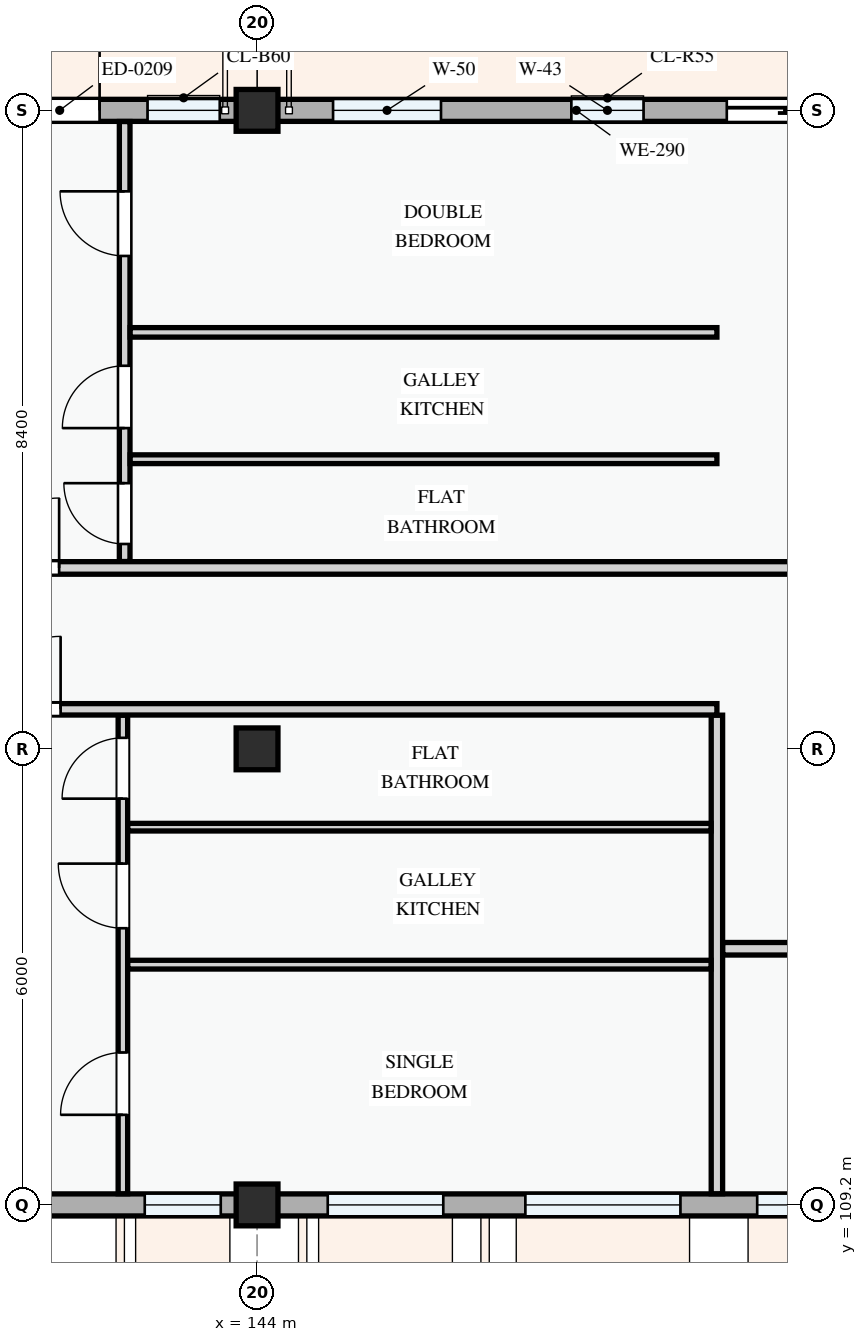
"""IFC4 building model, lengths in metres.
Left out: names, types, materials, properties, quantities, classifications, styles, units other than length and angle.
Written with IfcOpenShell. Run it as: python <this file> out.ifc"""

import sys

from ifc_helpers import new_model, si_unit, direction, frame, frame_2d, origin, origin_2d, place, context, subcontext, project, spatial, rectangle, extrude, element, fill, save


model = new_model("IFC4")
c1 = context("Model", 3, precision=1e-05, world=origin(), true_north=direction((0.0, 1.0)))
c2 = subcontext(c1, "Body", "Model", "MODEL_VIEW")
j1 = project(units=[si_unit("LENGTHUNIT", "METRE"), si_unit("PLANEANGLEUNIT", "RADIAN")], contexts=[c1])
p1 = place(None, origin())
s1 = spatial("IfcSite", under=j1, at=p1, CompositionType="ELEMENT")
p2 = place(p1, origin())
s2 = spatial("IfcBuilding", under=s1, at=p2, CompositionType="ELEMENT")
p3 = place(p2, frame((0.0, 0.0, 24.6)))
s3 = spatial("IfcBuildingStorey", under=s2, at=p3, CompositionType="ELEMENT", Elevation=24.6)
for number, where, z_axis, x_axis in (
    (1, (144.0, 109.2, 0.0), (0.0, 0.0, 1.0), (1.0, 0.0, 0.0)),
    (2, (144.0, 115.2, 0.0), (0.0, 0.0, 1.0), (1.0, 0.0, 0.0)),
    (3, (144.0, 123.6, 0.0), (0.0, 0.0, 1.0), (1.0, 0.0, 0.0)),
):
    element("IfcColumn", number, at=place(p3, frame(where, z_axis=z_axis, x_axis=x_axis)), inside=s3, PredefinedType="COLUMN", context=c2, shape_type="SweptSolid", body=[
        extrude(rectangle(XDim=0.55, YDim=0.55, at=origin_2d()), origin(), (0.0, 0.0, 1.0), 3.3),
    ])
p4 = place(p3, frame((152.4, 123.6, 0.0), z_axis=(0.0, 0.0, 1.0), x_axis=(-1.0, 0.0, 0.0)))
e4 = element("IfcWall", 4, at=p4, inside=s3, PredefinedType="STANDARD", context=c2, shape_type="SweptSolid", body=[
    extrude(rectangle(XDim=8.4, YDim=0.29, at=frame_2d((4.2, 0.0))), origin(), (0.0, 0.0, 1.0), 2.375),
])
p5 = place(p4, frame((0.62, 0.0, 0.0)))
e5 = element("IfcOpeningElement", 5, at=p5, cuts=e4, PredefinedType="OPENING", context=c2, shape_type="SweptSolid", body=[
    extrude(rectangle(XDim=1.6, YDim=2.2, at=frame_2d((0.8, 1.1))), frame((0.0, 0.155, 0.0), z_axis=(0.0, -1.0, 0.0), x_axis=(1.0, 0.0, 0.0)), (0.0, 0.0, 1.0), 0.31),
])
p6 = place(p4, frame((3.315, 0.0, 0.78)))
e6 = element("IfcOpeningElement", 6, at=p6, cuts=e4, PredefinedType="OPENING", context=c2, shape_type="SweptSolid", body=[
    extrude(rectangle(XDim=0.95, YDim=1.15, at=frame_2d((0.475, 0.575))), frame((0.0, 0.155, 0.0), z_axis=(0.0, -1.0, 0.0), x_axis=(1.0, 0.0, 0.0)), (0.0, 0.0, 1.0), 0.31),
])
p7 = place(p4, frame((5.98, 0.0, 0.78)))
e7 = element("IfcOpeningElement", 7, at=p7, cuts=e4, PredefinedType="OPENING", context=c2, shape_type="SweptSolid", body=[
    extrude(rectangle(XDim=1.42, YDim=1.38, at=frame_2d((0.71, 0.69))), frame((0.0, 0.155, 0.0), z_axis=(0.0, -1.0, 0.0), x_axis=(1.0, 0.0, 0.0)), (0.0, 0.0, 1.0), 0.31),
])
p8 = place(p3, frame((144.0, 123.6, 0.0), z_axis=(0.0, 0.0, 1.0), x_axis=(-1.0, 0.0, 0.0)))
e8 = element("IfcWall", 8, at=p8, inside=s3, PredefinedType="STANDARD", context=c2, shape_type="SweptSolid", body=[
    extrude(rectangle(XDim=6.0, YDim=0.29, at=frame_2d((3.0, 0.0))), origin(), (0.0, 0.0, 1.0), 2.475),
])
p9 = place(p8, frame((2.072, 0.0, 0.0)))
e9 = element("IfcOpeningElement", 9, at=p9, cuts=e8, PredefinedType="OPENING", context=c2, shape_type="SweptSolid", body=[
    extrude(rectangle(XDim=1.05, YDim=2.15, at=frame_2d((0.525, 1.075))), frame((0.0, 0.155, 0.0), z_axis=(0.0, -1.0, 0.0), x_axis=(1.0, 0.0, 0.0)), (0.0, 0.0, 1.0), 0.31),
])
p10 = place(p8, frame((0.491, 0.0, 0.78)))
e10 = element("IfcOpeningElement", 10, at=p10, cuts=e8, PredefinedType="OPENING", context=c2, shape_type="SweptSolid", body=[
    extrude(rectangle(XDim=0.95, YDim=1.15, at=frame_2d((0.475, 0.575))), frame((0.0, 0.155, 0.0), z_axis=(0.0, -1.0, 0.0), x_axis=(1.0, 0.0, 0.0)), (0.0, 0.0, 1.0), 0.31),
])
p11 = place(p8, frame((3.471, 0.0, 0.78)))
e11 = element("IfcOpeningElement", 11, at=p11, cuts=e8, PredefinedType="OPENING", context=c2, shape_type="SweptSolid", body=[
    extrude(rectangle(XDim=2.04, YDim=1.46, at=frame_2d((1.02, 0.73))), frame((0.0, 0.155, 0.0), z_axis=(0.0, -1.0, 0.0), x_axis=(1.0, 0.0, 0.0)), (0.0, 0.0, 1.0), 0.31),
])
p12 = place(p3, frame((138.0, 109.2, 0.0), z_axis=(0.0, 0.0, 1.0), x_axis=(1.0, 0.0, 0.0)))
e12 = element("IfcWall", 12, at=p12, inside=s3, PredefinedType="STANDARD", context=c2, shape_type="SweptSolid", body=[
    extrude(rectangle(XDim=6.0, YDim=0.29, at=frame_2d((3.0, 0.0))), origin(), (0.0, 0.0, 1.0), 2.475),
])
p13 = place(p12, frame((1.438, 0.0, 0.78)))
e13 = element("IfcOpeningElement", 13, at=p13, cuts=e12, PredefinedType="OPENING", context=c2, shape_type="SweptSolid", body=[
    extrude(rectangle(XDim=1.55, YDim=1.4, at=frame_2d((0.775, 0.7))), frame((0.0, 0.155, 0.0), z_axis=(0.0, -1.0, 0.0), x_axis=(1.0, 0.0, 0.0)), (0.0, 0.0, 1.0), 0.31),
])
p14 = place(p12, frame((4.522, 0.0, 0.78)))
e14 = element("IfcOpeningElement", 14, at=p14, cuts=e12, PredefinedType="OPENING", context=c2, shape_type="SweptSolid", body=[
    extrude(rectangle(XDim=1.0, YDim=1.25, at=frame_2d((0.5, 0.625))), frame((0.0, 0.155, 0.0), z_axis=(0.0, -1.0, 0.0), x_axis=(1.0, 0.0, 0.0)), (0.0, 0.0, 1.0), 0.31),
])
p15 = place(p3, frame((144.0, 109.2, 0.0), z_axis=(0.0, 0.0, 1.0), x_axis=(1.0, 0.0, 0.0)))
e15 = element("IfcWall", 15, at=p15, inside=s3, PredefinedType="STANDARD", context=c2, shape_type="SweptSolid", body=[
    extrude(rectangle(XDim=8.4, YDim=0.29, at=frame_2d((4.2, 0.0))), origin(), (0.0, 0.0, 1.0), 2.375),
])
p16 = place(p15, frame((0.93, 0.0, 0.78)))
e16 = element("IfcOpeningElement", 16, at=p16, cuts=e15, PredefinedType="OPENING", context=c2, shape_type="SweptSolid", body=[
    extrude(rectangle(XDim=1.52, YDim=1.42, at=frame_2d((0.76, 0.71))), frame((0.0, 0.155, 0.0), z_axis=(0.0, -1.0, 0.0), x_axis=(1.0, 0.0, 0.0)), (0.0, 0.0, 1.0), 0.31),
])
p17 = place(p15, frame((3.53, 0.0, 0.78)))
e17 = element("IfcOpeningElement", 17, at=p17, cuts=e15, PredefinedType="OPENING", context=c2, shape_type="SweptSolid", body=[
    extrude(rectangle(XDim=2.04, YDim=1.46, at=frame_2d((1.02, 0.73))), frame((0.0, 0.155, 0.0), z_axis=(0.0, -1.0, 0.0), x_axis=(1.0, 0.0, 0.0)), (0.0, 0.0, 1.0), 0.31),
])
p18 = place(p15, frame((6.58, 0.0, 0.78)))
e18 = element("IfcOpeningElement", 18, at=p18, cuts=e15, PredefinedType="OPENING", context=c2, shape_type="SweptSolid", body=[
    extrude(rectangle(XDim=1.1, YDim=1.3, at=frame_2d((0.55, 0.65))), frame((0.0, 0.155, 0.0), z_axis=(0.0, -1.0, 0.0), x_axis=(1.0, 0.0, 0.0)), (0.0, 0.0, 1.0), 0.31),
])
p19 = place(p3, frame((150.05, 109.347, 0.0), z_axis=(0.0, 0.0, 1.0), x_axis=(0.0, 1.0, 0.0)))
e19 = element("IfcWall", 19, at=p19, inside=s3, PredefinedType="PARTITIONING", context=c2, shape_type="SweptSolid", body=[
    extrude(rectangle(XDim=6.296, YDim=0.15, at=frame_2d((3.148, 0.0))), origin(), (0.0, 0.0, 1.0), 3.0),
])
p20 = place(p3, frame((150.127, 112.57, 0.0), z_axis=(0.0, 0.0, 1.0), x_axis=(1.0, 0.0, 0.0)))
e20 = element("IfcWall", 20, at=p20, inside=s3, PredefinedType="PARTITIONING", context=c2, shape_type="SweptSolid", body=[
    extrude(rectangle(XDim=2.413, YDim=0.165, at=frame_2d((1.207, 0.0))), origin(), (0.0, 0.0, 1.0), 3.0),
])
p21 = place(p3, frame((142.235, 109.347, 0.0), z_axis=(0.0, 0.0, 1.0), x_axis=(0.0, 1.0, 0.0)))
e21 = element("IfcWall", 21, at=p21, inside=s3, PredefinedType="PARTITIONING", context=c2, shape_type="SweptSolid", body=[
    extrude(rectangle(XDim=6.296, YDim=0.125, at=frame_2d((3.148, 0.0))), origin(), (0.0, 0.0, 1.0), 3.0),
])
p22 = place(p21, frame((1.038, 0.0, 0.0)))
e22 = element("IfcOpeningElement", 22, at=p22, cuts=e21, PredefinedType="OPENING", context=c2, shape_type="SweptSolid", body=[
    extrude(rectangle(XDim=0.82, YDim=2.08, at=frame_2d((0.41, 1.04))), frame((0.0, 0.073, 0.0), z_axis=(0.0, -1.0, 0.0), x_axis=(1.0, 0.0, 0.0)), (0.0, 0.0, 1.0), 0.145),
])
p23 = place(p21, frame((3.493, 0.0, 0.0)))
e23 = element("IfcOpeningElement", 23, at=p23, cuts=e21, PredefinedType="OPENING", context=c2, shape_type="SweptSolid", body=[
    extrude(rectangle(XDim=0.85, YDim=2.1, at=frame_2d((0.425, 1.05))), frame((0.0, 0.073, 0.0), z_axis=(0.0, -1.0, 0.0), x_axis=(1.0, 0.0, 0.0)), (0.0, 0.0, 1.0), 0.145),
])
p24 = place(p21, frame((5.198, 0.0, 0.0)))
e24 = element("IfcOpeningElement", 24, at=p24, cuts=e21, PredefinedType="OPENING", context=c2, shape_type="SweptSolid", body=[
    extrude(rectangle(XDim=0.8, YDim=2.1, at=frame_2d((0.4, 1.05))), frame((0.0, 0.073, 0.0), z_axis=(0.0, -1.0, 0.0), x_axis=(1.0, 0.0, 0.0)), (0.0, 0.0, 1.0), 0.145),
])
p25 = place(p3, frame((142.3, 112.361, 0.0), z_axis=(0.0, 0.0, 1.0), x_axis=(1.0, 0.0, 0.0)))
e25 = element("IfcWall", 25, at=p25, inside=s3, PredefinedType="PARTITIONING", context=c2, shape_type="SweptSolid", body=[
    extrude(rectangle(XDim=7.673, YDim=0.115, at=frame_2d((3.837, 0.0))), origin(), (0.0, 0.0, 1.0), 3.0),
])
p26 = place(p3, frame((142.3, 114.17, 0.0), z_axis=(0.0, 0.0, 1.0), x_axis=(1.0, 0.0, 0.0)))
e26 = element("IfcWall", 26, at=p26, inside=s3, PredefinedType="PARTITIONING", context=c2, shape_type="SweptSolid", body=[
    extrude(rectangle(XDim=7.673, YDim=0.1, at=frame_2d((3.837, 0.0))), origin(), (0.0, 0.0, 1.0), 3.0),
])
p27 = place(p3, frame((142.258, 117.665, 0.0), z_axis=(0.0, 0.0, 1.0), x_axis=(0.0, 1.0, 0.0)))
e27 = element("IfcWall", 27, at=p27, inside=s3, PredefinedType="PARTITIONING", context=c2, shape_type="SweptSolid", body=[
    extrude(rectangle(XDim=5.788, YDim=0.14, at=frame_2d((2.894, 0.0))), origin(), (0.0, 0.0, 1.0), 3.0),
])
p28 = place(p27, frame((0.231, 0.0, 0.0)))
e28 = element("IfcOpeningElement", 28, at=p28, cuts=e27, PredefinedType="OPENING", context=c2, shape_type="SweptSolid", body=[
    extrude(rectangle(XDim=0.8, YDim=2.1, at=frame_2d((0.4, 1.05))), frame((0.0, 0.08, 0.0), z_axis=(0.0, -1.0, 0.0), x_axis=(1.0, 0.0, 0.0)), (0.0, 0.0, 1.0), 0.16),
])
p29 = place(p27, frame((1.755, 0.0, 0.0)))
e29 = element("IfcOpeningElement", 29, at=p29, cuts=e27, PredefinedType="OPENING", context=c2, shape_type="SweptSolid", body=[
    extrude(rectangle(XDim=0.82, YDim=2.08, at=frame_2d((0.41, 1.04))), frame((0.0, 0.08, 0.0), z_axis=(0.0, -1.0, 0.0), x_axis=(1.0, 0.0, 0.0)), (0.0, 0.0, 1.0), 0.16),
])
p30 = place(p27, frame((4.02, 0.0, 0.0)))
e30 = element("IfcOpeningElement", 30, at=p30, cuts=e27, PredefinedType="OPENING", context=c2, shape_type="SweptSolid", body=[
    extrude(rectangle(XDim=0.85, YDim=2.1, at=frame_2d((0.425, 1.05))), frame((0.0, 0.08, 0.0), z_axis=(0.0, -1.0, 0.0), x_axis=(1.0, 0.0, 0.0)), (0.0, 0.0, 1.0), 0.16),
])
p31 = place(p3, frame((142.33, 120.679, 0.0), z_axis=(0.0, 0.0, 1.0), x_axis=(1.0, 0.0, 0.0)))
e31 = element("IfcWall", 31, at=p31, inside=s3, PredefinedType="PARTITIONING", context=c2, shape_type="SweptSolid", body=[
    extrude(rectangle(XDim=7.72, YDim=0.125, at=frame_2d((3.86, 0.0))), origin(), (0.0, 0.0, 1.0), 3.0),
])
p32 = place(p3, frame((142.33, 119.01, 0.0), z_axis=(0.0, 0.0, 1.0), x_axis=(1.0, 0.0, 0.0)))
e32 = element("IfcWall", 32, at=p32, inside=s3, PredefinedType="PARTITIONING", context=c2, shape_type="SweptSolid", body=[
    extrude(rectangle(XDim=7.72, YDim=0.115, at=frame_2d((3.86, 0.0))), origin(), (0.0, 0.0, 1.0), 3.0),
])
p33 = place(p3, frame((80.547, 115.72, 0.0), z_axis=(0.0, 0.0, 1.0), x_axis=(1.0, 0.0, 0.0)))
e33 = element("IfcWall", 33, at=p33, inside=s3, PredefinedType="PARTITIONING", context=c2, shape_type="SweptSolid", body=[
    extrude(rectangle(XDim=69.503, YDim=0.15, at=frame_2d((34.751, 0.0))), origin(), (0.0, 0.0, 1.0), 3.0),
])
p34 = place(p33, frame((2.367, 0.0, 0.0)))
e34 = element("IfcOpeningElement", 34, at=p34, cuts=e33, PredefinedType="OPENING", context=c2, shape_type="SweptSolid", body=[
    extrude(rectangle(XDim=0.92, YDim=2.1, at=frame_2d((0.46, 1.05))), frame((0.0, 0.085, 0.0), z_axis=(0.0, -1.0, 0.0), x_axis=(1.0, 0.0, 0.0)), (0.0, 0.0, 1.0), 0.17),
])
p35 = place(p33, frame((23.968, 0.0, 0.0)))
e35 = element("IfcOpeningElement", 35, at=p35, cuts=e33, PredefinedType="OPENING", context=c2, shape_type="SweptSolid", body=[
    extrude(rectangle(XDim=0.92, YDim=2.1, at=frame_2d((0.46, 1.05))), frame((0.0, 0.085, 0.0), z_axis=(0.0, -1.0, 0.0), x_axis=(1.0, 0.0, 0.0)), (0.0, 0.0, 1.0), 0.17),
])
p36 = place(p33, frame((39.133, 0.0, 0.0)))
e36 = element("IfcOpeningElement", 36, at=p36, cuts=e33, PredefinedType="OPENING", context=c2, shape_type="SweptSolid", body=[
    extrude(rectangle(XDim=0.92, YDim=2.1, at=frame_2d((0.46, 1.05))), frame((0.0, 0.085, 0.0), z_axis=(0.0, -1.0, 0.0), x_axis=(1.0, 0.0, 0.0)), (0.0, 0.0, 1.0), 0.17),
])
p37 = place(p33, frame((59.909, 0.0, 0.0)))
e37 = element("IfcOpeningElement", 37, at=p37, cuts=e33, PredefinedType="OPENING", context=c2, shape_type="SweptSolid", body=[
    extrude(rectangle(XDim=0.96, YDim=2.12, at=frame_2d((0.48, 1.06))), frame((0.0, 0.085, 0.0), z_axis=(0.0, -1.0, 0.0), x_axis=(1.0, 0.0, 0.0)), (0.0, 0.0, 1.0), 0.17),
])
p38 = place(p3, frame((80.547, 117.58, 0.0), z_axis=(0.0, 0.0, 1.0), x_axis=(1.0, 0.0, 0.0)))
e38 = element("IfcWall", 38, at=p38, inside=s3, PredefinedType="PARTITIONING", context=c2, shape_type="SweptSolid", body=[
    extrude(rectangle(XDim=71.993, YDim=0.165, at=frame_2d((35.997, 0.0))), origin(), (0.0, 0.0, 1.0), 3.0),
])
p39 = place(p38, frame((2.262, 0.0, 0.0)))
e39 = element("IfcOpeningElement", 39, at=p39, cuts=e38, PredefinedType="OPENING", context=c2, shape_type="SweptSolid", body=[
    extrude(rectangle(XDim=0.92, YDim=2.1, at=frame_2d((0.46, 1.05))), frame((0.0, 0.093, 0.0), z_axis=(0.0, -1.0, 0.0), x_axis=(1.0, 0.0, 0.0)), (0.0, 0.0, 1.0), 0.185),
])
p40 = place(p38, frame((23.945, 0.0, 0.0)))
e40 = element("IfcOpeningElement", 40, at=p40, cuts=e38, PredefinedType="OPENING", context=c2, shape_type="SweptSolid", body=[
    extrude(rectangle(XDim=0.92, YDim=2.1, at=frame_2d((0.46, 1.05))), frame((0.0, 0.093, 0.0), z_axis=(0.0, -1.0, 0.0), x_axis=(1.0, 0.0, 0.0)), (0.0, 0.0, 1.0), 0.185),
])
p41 = place(p38, frame((39.133, 0.0, 0.0)))
e41 = element("IfcOpeningElement", 41, at=p41, cuts=e38, PredefinedType="OPENING", context=c2, shape_type="SweptSolid", body=[
    extrude(rectangle(XDim=0.92, YDim=2.1, at=frame_2d((0.46, 1.05))), frame((0.0, 0.093, 0.0), z_axis=(0.0, -1.0, 0.0), x_axis=(1.0, 0.0, 0.0)), (0.0, 0.0, 1.0), 0.185),
])
p42 = place(p38, frame((59.929, 0.0, 0.0)))
e42 = element("IfcOpeningElement", 42, at=p42, cuts=e38, PredefinedType="OPENING", context=c2, shape_type="SweptSolid", body=[
    extrude(rectangle(XDim=0.92, YDim=2.1, at=frame_2d((0.46, 1.05))), frame((0.0, 0.093, 0.0), z_axis=(0.0, -1.0, 0.0), x_axis=(1.0, 0.0, 0.0)), (0.0, 0.0, 1.0), 0.185),
])
p43 = place(p5, frame((1.6, 0.0, 0.0), z_axis=(0.0, 0.0, 1.0), x_axis=(-1.0, 0.0, 0.0)))
e43 = element("IfcDoor", 43, at=p43, inside=s3, OperationType="SLIDING_TO_LEFT", PredefinedType="DOOR", context=c2, shape_type="SweptSolid", body=[
    extrude(rectangle(XDim=1.6, YDim=2.2, at=frame_2d((0.8, 1.1))), frame((0.0, 0.025, 0.0), z_axis=(0.0, -1.0, 0.0), x_axis=(1.0, 0.0, 0.0)), (0.0, 0.0, 1.0), 0.05),
])
fill(e5, e43)
p44 = place(p6, origin())
e44 = element("IfcWindow", 44, at=p44, inside=s3, PartitioningType="SINGLE_PANEL", PredefinedType="WINDOW", context=c2, shape_type="SweptSolid", body=[
    extrude(rectangle(XDim=0.95, YDim=1.15, at=frame_2d((0.475, 0.575))), frame((0.0, 0.03, 0.0), z_axis=(0.0, -1.0, 0.0), x_axis=(1.0, 0.0, 0.0)), (0.0, 0.0, 1.0), 0.06),
])
fill(e6, e44)
p45 = place(p7, origin())
e45 = element("IfcWindow", 45, at=p45, inside=s3, PartitioningType="SINGLE_PANEL", PredefinedType="WINDOW", context=c2, shape_type="SweptSolid", body=[
    extrude(rectangle(XDim=1.42, YDim=1.38, at=frame_2d((0.71, 0.69))), frame((0.0, 0.03, 0.0), z_axis=(0.0, -1.0, 0.0), x_axis=(1.0, 0.0, 0.0)), (0.0, 0.0, 1.0), 0.06),
])
fill(e7, e45)
p46 = place(p9, frame((1.05, 0.0, 0.0), z_axis=(0.0, 0.0, 1.0), x_axis=(-1.0, 0.0, 0.0)))
e46 = element("IfcDoor", 46, at=p46, inside=s3, OperationType="SINGLE_SWING_RIGHT", PredefinedType="DOOR", context=c2, shape_type="SweptSolid", body=[
    extrude(rectangle(XDim=1.05, YDim=2.15, at=frame_2d((0.525, 1.075))), frame((0.0, 0.025, 0.0), z_axis=(0.0, -1.0, 0.0), x_axis=(1.0, 0.0, 0.0)), (0.0, 0.0, 1.0), 0.05),
])
fill(e9, e46)
p47 = place(p10, origin())
e47 = element("IfcWindow", 47, at=p47, inside=s3, PartitioningType="SINGLE_PANEL", PredefinedType="WINDOW", context=c2, shape_type="SweptSolid", body=[
    extrude(rectangle(XDim=0.95, YDim=1.15, at=frame_2d((0.475, 0.575))), frame((0.0, 0.03, 0.0), z_axis=(0.0, -1.0, 0.0), x_axis=(1.0, 0.0, 0.0)), (0.0, 0.0, 1.0), 0.06),
])
fill(e10, e47)
p48 = place(p14, origin())
e48 = element("IfcWindow", 48, at=p48, inside=s3, PartitioningType="SINGLE_PANEL", PredefinedType="WINDOW", context=c2, shape_type="SweptSolid", body=[
    extrude(rectangle(XDim=1.0, YDim=1.25, at=frame_2d((0.5, 0.625))), frame((0.0, 0.03, 0.0), z_axis=(0.0, -1.0, 0.0), x_axis=(1.0, 0.0, 0.0)), (0.0, 0.0, 1.0), 0.06),
])
fill(e14, e48)
p49 = place(p16, origin())
e49 = element("IfcWindow", 49, at=p49, inside=s3, PartitioningType="SINGLE_PANEL", PredefinedType="WINDOW", context=c2, shape_type="SweptSolid", body=[
    extrude(rectangle(XDim=1.52, YDim=1.42, at=frame_2d((0.76, 0.71))), frame((0.0, 0.03, 0.0), z_axis=(0.0, -1.0, 0.0), x_axis=(1.0, 0.0, 0.0)), (0.0, 0.0, 1.0), 0.06),
])
fill(e16, e49)
p50 = place(p17, origin())
e50 = element("IfcWindow", 50, at=p50, inside=s3, PartitioningType="DOUBLE_PANEL_VERTICAL", PredefinedType="WINDOW", context=c2, shape_type="SweptSolid", body=[
    extrude(rectangle(XDim=2.04, YDim=1.46, at=frame_2d((1.02, 0.73))), frame((0.0, 0.03, 0.0), z_axis=(0.0, -1.0, 0.0), x_axis=(1.0, 0.0, 0.0)), (0.0, 0.0, 1.0), 0.06),
])
fill(e17, e50)
p51 = place(p18, origin())
e51 = element("IfcWindow", 51, at=p51, inside=s3, PartitioningType="SINGLE_PANEL", PredefinedType="WINDOW", context=c2, shape_type="SweptSolid", body=[
    extrude(rectangle(XDim=1.1, YDim=1.3, at=frame_2d((0.55, 0.65))), frame((0.0, 0.03, 0.0), z_axis=(0.0, -1.0, 0.0), x_axis=(1.0, 0.0, 0.0)), (0.0, 0.0, 1.0), 0.06),
])
fill(e18, e51)
p52 = place(p22, origin())
e52 = element("IfcDoor", 52, at=p52, inside=s3, OperationType="SINGLE_SWING_LEFT", PredefinedType="DOOR", context=c2, shape_type="SweptSolid", body=[
    extrude(rectangle(XDim=0.82, YDim=2.08, at=frame_2d((0.41, 1.04))), frame((0.0, 0.025, 0.0), z_axis=(0.0, -1.0, 0.0), x_axis=(1.0, 0.0, 0.0)), (0.0, 0.0, 1.0), 0.05),
])
fill(e22, e52)
p53 = place(p23, origin())
e53 = element("IfcDoor", 53, at=p53, inside=s3, OperationType="SINGLE_SWING_RIGHT", PredefinedType="DOOR", context=c2, shape_type="SweptSolid", body=[
    extrude(rectangle(XDim=0.85, YDim=2.1, at=frame_2d((0.425, 1.05))), frame((0.0, 0.025, 0.0), z_axis=(0.0, -1.0, 0.0), x_axis=(1.0, 0.0, 0.0)), (0.0, 0.0, 1.0), 0.05),
])
fill(e23, e53)
p54 = place(p24, origin())
e54 = element("IfcDoor", 54, at=p54, inside=s3, OperationType="SINGLE_SWING_LEFT", PredefinedType="DOOR", context=c2, shape_type="SweptSolid", body=[
    extrude(rectangle(XDim=0.8, YDim=2.1, at=frame_2d((0.4, 1.05))), frame((0.0, 0.025, 0.0), z_axis=(0.0, -1.0, 0.0), x_axis=(1.0, 0.0, 0.0)), (0.0, 0.0, 1.0), 0.05),
])
fill(e24, e54)
p55 = place(p28, origin())
e55 = element("IfcDoor", 55, at=p55, inside=s3, OperationType="SINGLE_SWING_RIGHT", PredefinedType="DOOR", context=c2, shape_type="SweptSolid", body=[
    extrude(rectangle(XDim=0.8, YDim=2.1, at=frame_2d((0.4, 1.05))), frame((0.0, 0.025, 0.0), z_axis=(0.0, -1.0, 0.0), x_axis=(1.0, 0.0, 0.0)), (0.0, 0.0, 1.0), 0.05),
])
fill(e28, e55)
p56 = place(p29, origin())
e56 = element("IfcDoor", 56, at=p56, inside=s3, OperationType="SINGLE_SWING_LEFT", PredefinedType="DOOR", context=c2, shape_type="SweptSolid", body=[
    extrude(rectangle(XDim=0.82, YDim=2.08, at=frame_2d((0.41, 1.04))), frame((0.0, 0.025, 0.0), z_axis=(0.0, -1.0, 0.0), x_axis=(1.0, 0.0, 0.0)), (0.0, 0.0, 1.0), 0.05),
])
fill(e29, e56)
p57 = place(p30, origin())
e57 = element("IfcDoor", 57, at=p57, inside=s3, OperationType="SINGLE_SWING_RIGHT", PredefinedType="DOOR", context=c2, shape_type="SweptSolid", body=[
    extrude(rectangle(XDim=0.85, YDim=2.1, at=frame_2d((0.425, 1.05))), frame((0.0, 0.025, 0.0), z_axis=(0.0, -1.0, 0.0), x_axis=(1.0, 0.0, 0.0)), (0.0, 0.0, 1.0), 0.05),
])
fill(e30, e57)
p58 = place(p37, origin())
e58 = element("IfcDoor", 58, at=p58, inside=s3, OperationType="SINGLE_SWING_RIGHT", PredefinedType="DOOR", context=c2, shape_type="SweptSolid", body=[
    extrude(rectangle(XDim=0.96, YDim=2.12, at=frame_2d((0.48, 1.06))), frame((0.0, 0.025, 0.0), z_axis=(0.0, -1.0, 0.0), x_axis=(1.0, 0.0, 0.0)), (0.0, 0.0, 1.0), 0.05),
])
fill(e37, e58)
p59 = place(p42, origin())
e59 = element("IfcDoor", 59, at=p59, inside=s3, OperationType="SINGLE_SWING_RIGHT", PredefinedType="DOOR", context=c2, shape_type="SweptSolid", body=[
    extrude(rectangle(XDim=0.92, YDim=2.1, at=frame_2d((0.46, 1.05))), frame((0.0, 0.025, 0.0), z_axis=(0.0, -1.0, 0.0), x_axis=(1.0, 0.0, 0.0)), (0.0, 0.0, 1.0), 0.05),
])
fill(e42, e59)
save(model, sys.argv[1])
